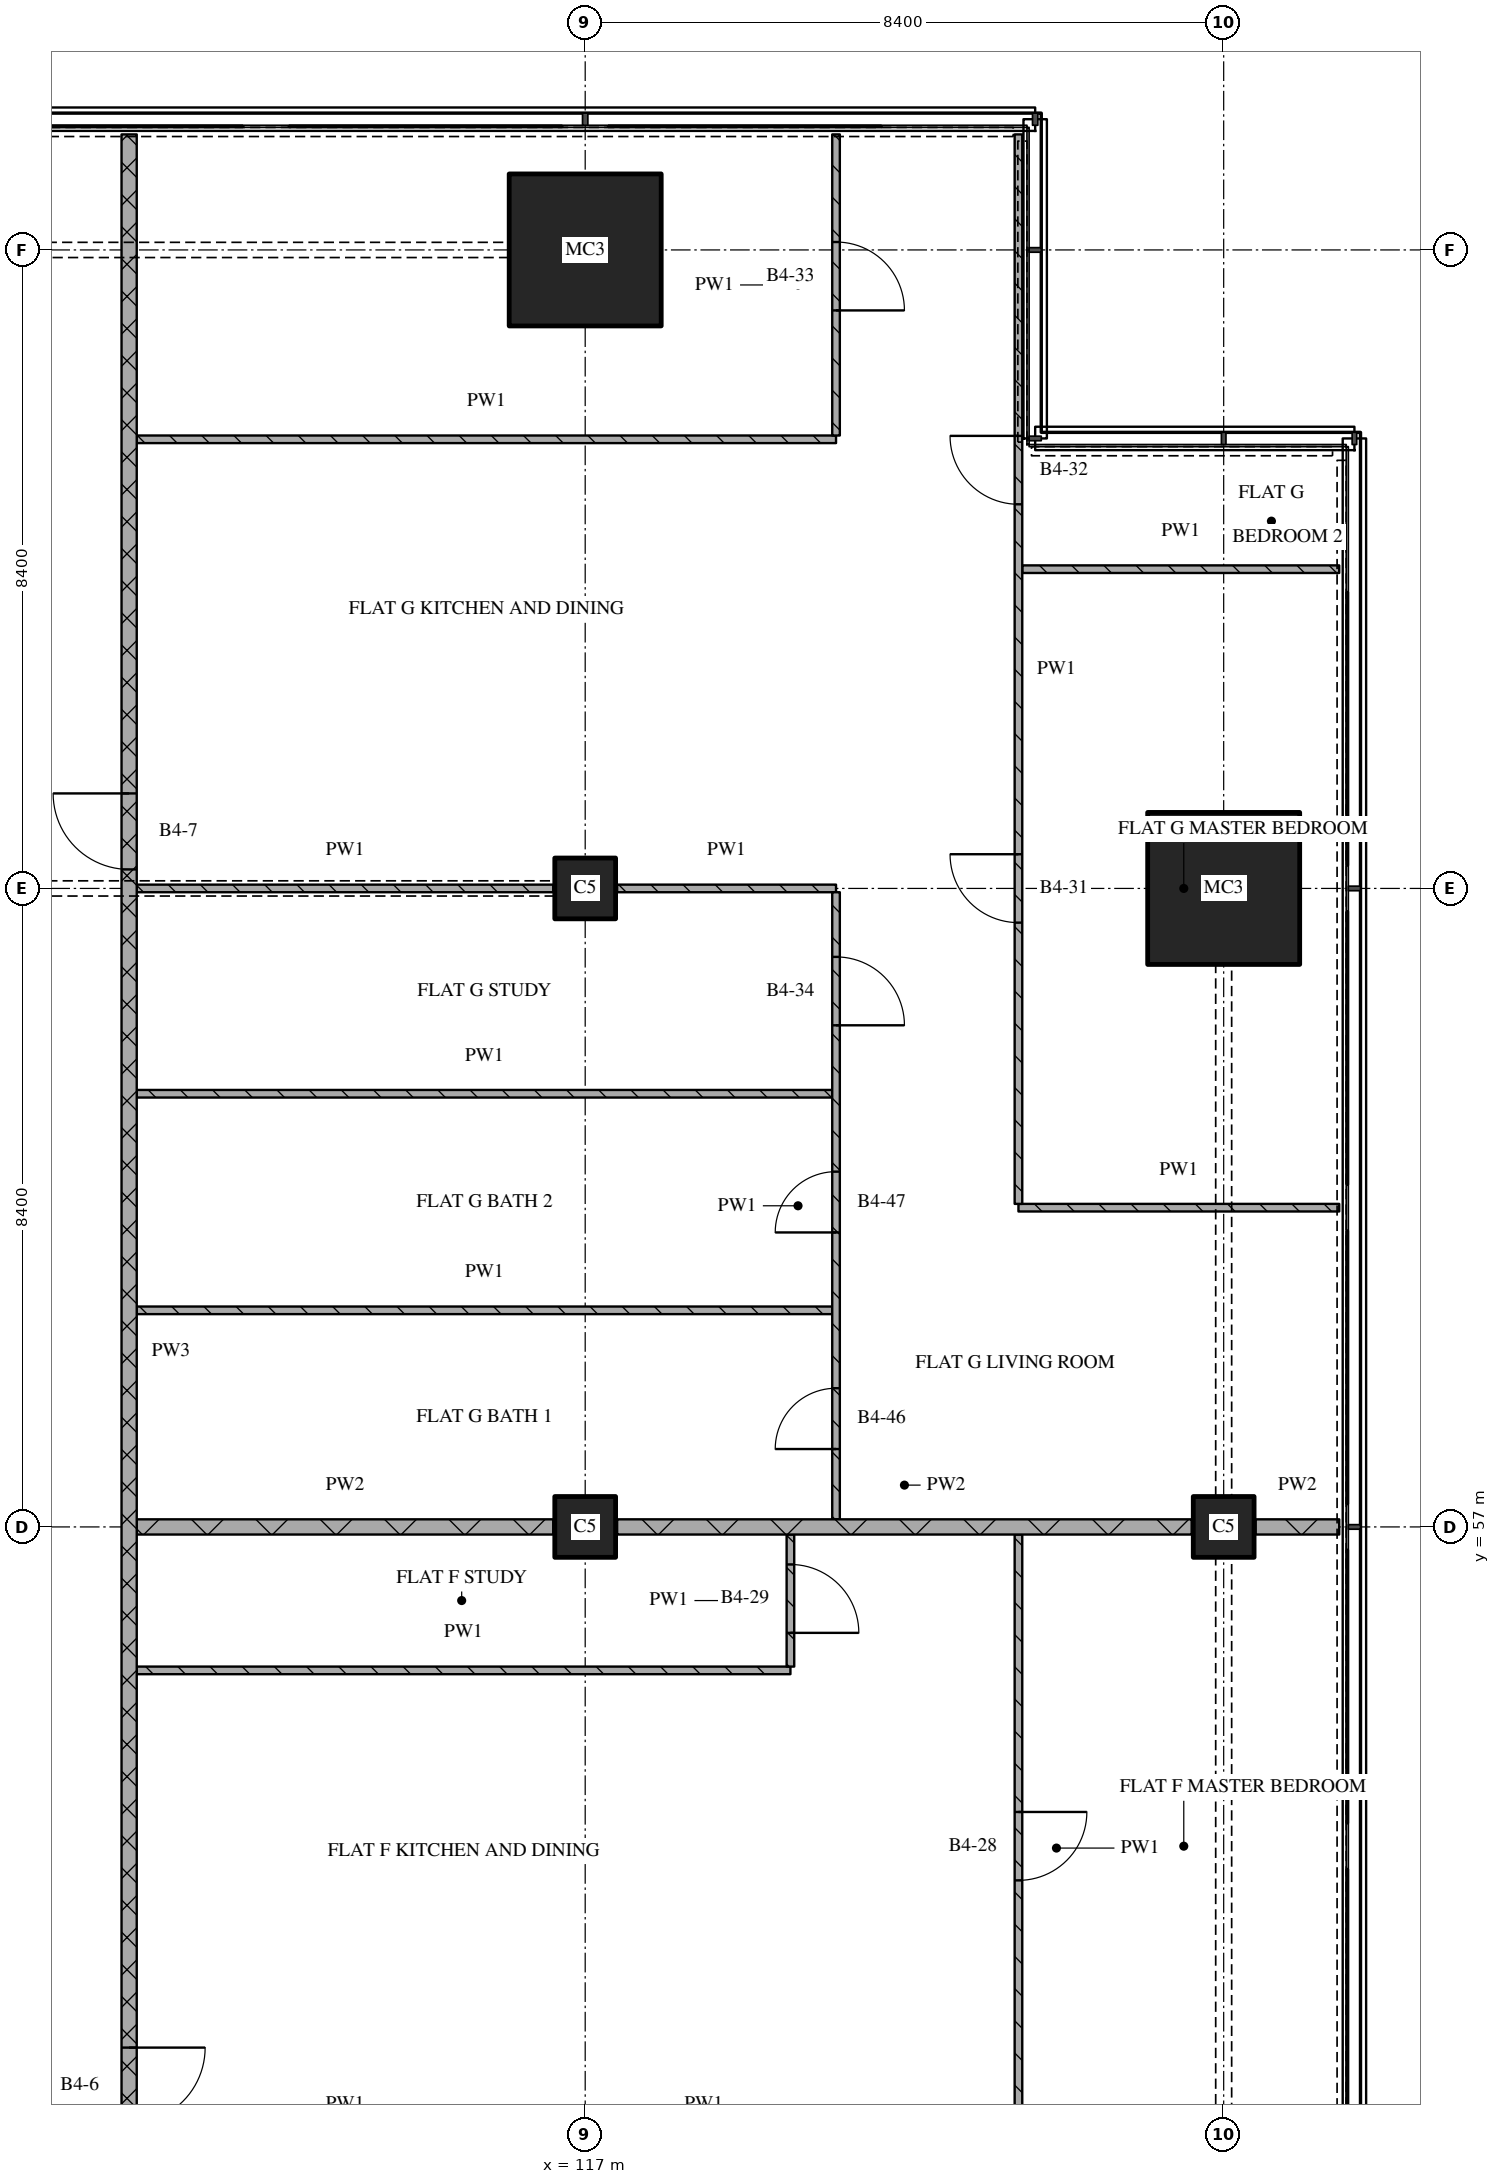
"""IFC4 building model, lengths in metres.
Left out: names, types, materials, properties, quantities, classifications, styles, units other than length and angle.
Written with IfcOpenShell. Run it as: python <this file> out.ifc"""

import sys

from ifc_helpers import new_model, si_unit, direction, frame, frame_2d, origin, origin_2d, place, context, subcontext, project, spatial, rectangle, extrude, element, fill, save


model = new_model("IFC4")
c1 = context("Model", 3, precision=1e-05, world=origin(), true_north=direction((0.0, 1.0)))
c2 = subcontext(c1, "Body", "Model", "MODEL_VIEW")
j1 = project(units=[si_unit("LENGTHUNIT", "METRE"), si_unit("PLANEANGLEUNIT", "RADIAN")], contexts=[c1])
p1 = place(None, origin())
s1 = spatial("IfcSite", under=j1, at=p1, CompositionType="ELEMENT")
p2 = place(p1, origin())
s2 = spatial("IfcBuilding", under=s1, at=p2, CompositionType="ELEMENT")
p3 = place(p2, frame((0.0, 0.0, 127.65)))
s3 = spatial("IfcBuildingStorey", under=s2, at=p3, CompositionType="ELEMENT", Elevation=127.65)
for number, where, z_axis, x_axis in (
    (1, (117.0, 57.0, 0.0), (0.0, 0.0, 1.0), (1.0, 0.0, 0.0)),
    (2, (117.0, 65.4, 0.0), (0.0, 0.0, 1.0), (1.0, 0.0, 0.0)),
):
    element("IfcColumn", number, at=place(p3, frame(where, z_axis=z_axis, x_axis=x_axis)), inside=s3, PredefinedType="COLUMN", context=c2, shape_type="SweptSolid", body=[
        extrude(rectangle(XDim=0.8, YDim=0.8, at=origin_2d()), origin(), (0.0, 0.0, 1.0), 3.6),
    ])
p4 = place(p3, frame((117.0, 73.8, 0.0), z_axis=(0.0, 0.0, 1.0), x_axis=(1.0, 0.0, 0.0)))
e3 = element("IfcColumn", 3, at=p4, inside=s3, PredefinedType="COLUMN", context=c2, shape_type="SweptSolid", body=[
    extrude(rectangle(XDim=2.0, YDim=2.0, at=origin_2d()), origin(), (0.0, 0.0, 1.0), 3.6),
])
p5 = place(p3, frame((125.4, 57.0, 0.0), z_axis=(0.0, 0.0, 1.0), x_axis=(1.0, 0.0, 0.0)))
e4 = element("IfcColumn", 4, at=p5, inside=s3, PredefinedType="COLUMN", context=c2, shape_type="SweptSolid", body=[
    extrude(rectangle(XDim=0.8, YDim=0.8, at=origin_2d()), origin(), (0.0, 0.0, 1.0), 3.6),
])
p6 = place(p3, frame((125.4, 65.4, 0.0), z_axis=(0.0, 0.0, 1.0), x_axis=(1.0, 0.0, 0.0)))
e5 = element("IfcColumn", 5, at=p6, inside=s3, PredefinedType="COLUMN", context=c2, shape_type="SweptSolid", body=[
    extrude(rectangle(XDim=2.0, YDim=2.0, at=origin_2d()), origin(), (0.0, 0.0, 1.0), 3.6),
])
p7 = place(p3, frame((111.1, 55.113, 0.0), z_axis=(0.0, 0.0, 1.0), x_axis=(1.0, 0.0, 0.0)))
e6 = element("IfcWall", 6, at=p7, inside=s3, PredefinedType="PARTITIONING", context=c2, shape_type="SweptSolid", body=[
    extrude(rectangle(XDim=8.6, YDim=0.1, at=frame_2d((4.3, 0.0))), origin(), (0.0, 0.0, 1.0), 3.32),
])
p8 = place(p3, frame((111.1, 57.0, 0.0), z_axis=(0.0, 0.0, 1.0), x_axis=(1.0, 0.0, 0.0)))
e7 = element("IfcWall", 7, at=p8, inside=s3, PredefinedType="PARTITIONING", context=c2, shape_type="SweptSolid", body=[
    extrude(rectangle(XDim=5.48, YDim=0.2, at=frame_2d((2.74, 0.0))), origin(), (0.0, 0.0, 1.0), 3.32),
])
p9 = place(p3, frame((117.42, 57.0, 0.0), z_axis=(0.0, 0.0, 1.0), x_axis=(1.0, 0.0, 0.0)))
e8 = element("IfcWall", 8, at=p9, inside=s3, PredefinedType="PARTITIONING", context=c2, shape_type="SweptSolid", body=[
    extrude(rectangle(XDim=7.56, YDim=0.2, at=frame_2d((3.78, 0.0))), origin(), (0.0, 0.0, 1.0), 3.32),
])
p10 = place(p3, frame((125.82, 57.0, 0.0), z_axis=(0.0, 0.0, 1.0), x_axis=(1.0, 0.0, 0.0)))
e9 = element("IfcWall", 9, at=p10, inside=s3, PredefinedType="PARTITIONING", context=c2, shape_type="SweptSolid", body=[
    extrude(rectangle(XDim=1.1, YDim=0.2, at=frame_2d((0.55, 0.0))), origin(), (0.0, 0.0, 1.0), 3.32),
])
p11 = place(p3, frame((111.1, 59.85, 0.0), z_axis=(0.0, 0.0, 1.0), x_axis=(1.0, 0.0, 0.0)))
e10 = element("IfcWall", 10, at=p11, inside=s3, PredefinedType="PARTITIONING", context=c2, shape_type="SweptSolid", body=[
    extrude(rectangle(XDim=9.15, YDim=0.1, at=frame_2d((4.575, 0.0))), origin(), (0.0, 0.0, 1.0), 3.32),
])
p12 = place(p3, frame((122.7, 61.2, 0.0), z_axis=(0.0, 0.0, 1.0), x_axis=(1.0, 0.0, 0.0)))
e11 = element("IfcWall", 11, at=p12, inside=s3, PredefinedType="PARTITIONING", context=c2, shape_type="SweptSolid", body=[
    extrude(rectangle(XDim=4.22, YDim=0.1, at=frame_2d((2.11, 0.0))), origin(), (0.0, 0.0, 1.0), 3.32),
])
p13 = place(p3, frame((111.1, 62.699, 0.0), z_axis=(0.0, 0.0, 1.0), x_axis=(1.0, 0.0, 0.0)))
e12 = element("IfcWall", 12, at=p13, inside=s3, PredefinedType="PARTITIONING", context=c2, shape_type="SweptSolid", body=[
    extrude(rectangle(XDim=9.15, YDim=0.1, at=frame_2d((4.575, 0.0))), origin(), (0.0, 0.0, 1.0), 3.32),
])
p14 = place(p3, frame((111.1, 65.4, 0.0), z_axis=(0.0, 0.0, 1.0), x_axis=(1.0, 0.0, 0.0)))
e13 = element("IfcWall", 13, at=p14, inside=s3, PredefinedType="PARTITIONING", context=c2, shape_type="SweptSolid", body=[
    extrude(rectangle(XDim=5.48, YDim=0.1, at=frame_2d((2.74, 0.0))), origin(), (0.0, 0.0, 1.0), 2.82),
])
p15 = place(p3, frame((117.42, 65.4, 0.0), z_axis=(0.0, 0.0, 1.0), x_axis=(1.0, 0.0, 0.0)))
e14 = element("IfcWall", 14, at=p15, inside=s3, PredefinedType="PARTITIONING", context=c2, shape_type="SweptSolid", body=[
    extrude(rectangle(XDim=2.88, YDim=0.1, at=frame_2d((1.44, 0.0))), origin(), (0.0, 0.0, 1.0), 3.32),
])
p16 = place(p3, frame((122.75, 69.6, 0.0), z_axis=(0.0, 0.0, 1.0), x_axis=(1.0, 0.0, 0.0)))
e15 = element("IfcWall", 15, at=p16, inside=s3, PredefinedType="PARTITIONING", context=c2, shape_type="SweptSolid", body=[
    extrude(rectangle(XDim=4.17, YDim=0.1, at=frame_2d((2.085, 0.0))), origin(), (0.0, 0.0, 1.0), 3.32),
])
p17 = place(p3, frame((111.1, 71.309, 0.0), z_axis=(0.0, 0.0, 1.0), x_axis=(1.0, 0.0, 0.0)))
e16 = element("IfcWall", 16, at=p17, inside=s3, PredefinedType="PARTITIONING", context=c2, shape_type="SweptSolid", body=[
    extrude(rectangle(XDim=9.2, YDim=0.1, at=frame_2d((4.6, 0.0))), origin(), (0.0, 0.0, 1.0), 3.32),
])
p18 = place(p3, frame((111.0, 75.32, 0.0), z_axis=(0.0, 0.0, 1.0), x_axis=(0.0, -1.0, 0.0)))
e17 = element("IfcWall", 17, at=p18, inside=s3, PredefinedType="PARTITIONING", context=c2, shape_type="SweptSolid", body=[
    extrude(rectangle(XDim=32.02, YDim=0.2, at=frame_2d((16.01, 0.0))), origin(), (0.0, 0.0, 1.0), 3.32),
])
p19 = place(p18, frame((8.67, 0.0, 0.0)))
e18 = element("IfcOpeningElement", 18, at=p19, cuts=e17, PredefinedType="OPENING", context=c2, shape_type="SweptSolid", body=[
    extrude(rectangle(XDim=1.0, YDim=2.1, at=frame_2d((0.5, 1.05))), frame((0.0, 0.11, 0.0), z_axis=(0.0, -1.0, 0.0), x_axis=(1.0, 0.0, 0.0)), (0.0, 0.0, 1.0), 0.22),
])
p20 = place(p18, frame((25.17, 0.0, 0.0)))
e19 = element("IfcOpeningElement", 19, at=p20, cuts=e17, PredefinedType="OPENING", context=c2, shape_type="SweptSolid", body=[
    extrude(rectangle(XDim=1.0, YDim=2.1, at=frame_2d((0.5, 1.05))), frame((0.0, 0.11, 0.0), z_axis=(0.0, -1.0, 0.0), x_axis=(1.0, 0.0, 0.0)), (0.0, 0.0, 1.0), 0.22),
])
p21 = place(p3, frame((119.7, 55.163, 0.0), z_axis=(0.0, 0.0, 1.0), x_axis=(0.0, 1.0, 0.0)))
e20 = element("IfcWall", 20, at=p21, inside=s3, PredefinedType="PARTITIONING", context=c2, shape_type="SweptSolid", body=[
    extrude(rectangle(XDim=1.737, YDim=0.1, at=frame_2d((0.869, 0.0))), origin(), (0.0, 0.0, 1.0), 3.32),
])
p22 = place(p21, frame((0.444, 0.0, 0.0)))
e21 = element("IfcOpeningElement", 21, at=p22, cuts=e20, PredefinedType="OPENING", context=c2, shape_type="SweptSolid", body=[
    extrude(rectangle(XDim=0.9, YDim=2.1, at=frame_2d((0.45, 1.05))), frame((0.0, 0.06, 0.0), z_axis=(0.0, -1.0, 0.0), x_axis=(1.0, 0.0, 0.0)), (0.0, 0.0, 1.0), 0.12),
])
p23 = place(p3, frame((120.3, 57.1, 0.0), z_axis=(0.0, 0.0, 1.0), x_axis=(0.0, 1.0, 0.0)))
e22 = element("IfcWall", 22, at=p23, inside=s3, PredefinedType="PARTITIONING", context=c2, shape_type="SweptSolid", body=[
    extrude(rectangle(XDim=8.25, YDim=0.1, at=frame_2d((4.125, 0.0))), origin(), (0.0, 0.0, 1.0), 3.32),
])
p24 = place(p23, frame((0.925, 0.0, 0.0)))
e23 = element("IfcOpeningElement", 23, at=p24, cuts=e22, PredefinedType="OPENING", context=c2, shape_type="SweptSolid", body=[
    extrude(rectangle(XDim=0.8, YDim=2.1, at=frame_2d((0.4, 1.05))), frame((0.0, 0.06, 0.0), z_axis=(0.0, -1.0, 0.0), x_axis=(1.0, 0.0, 0.0)), (0.0, 0.0, 1.0), 0.12),
])
p25 = place(p23, frame((3.774, 0.0, 0.0)))
e24 = element("IfcOpeningElement", 24, at=p25, cuts=e22, PredefinedType="OPENING", context=c2, shape_type="SweptSolid", body=[
    extrude(rectangle(XDim=0.8, YDim=2.1, at=frame_2d((0.4, 1.05))), frame((0.0, 0.06, 0.0), z_axis=(0.0, -1.0, 0.0), x_axis=(1.0, 0.0, 0.0)), (0.0, 0.0, 1.0), 0.12),
])
p26 = place(p23, frame((6.5, 0.0, 0.0)))
e25 = element("IfcOpeningElement", 25, at=p26, cuts=e22, PredefinedType="OPENING", context=c2, shape_type="SweptSolid", body=[
    extrude(rectangle(XDim=0.9, YDim=2.1, at=frame_2d((0.45, 1.05))), frame((0.0, 0.06, 0.0), z_axis=(0.0, -1.0, 0.0), x_axis=(1.0, 0.0, 0.0)), (0.0, 0.0, 1.0), 0.12),
])
p27 = place(p3, frame((120.3, 71.359, 0.0), z_axis=(0.0, 0.0, 1.0), x_axis=(0.0, 1.0, 0.0)))
e26 = element("IfcWall", 26, at=p27, inside=s3, PredefinedType="PARTITIONING", context=c2, shape_type="SweptSolid", body=[
    extrude(rectangle(XDim=3.961, YDim=0.1, at=frame_2d((1.981, 0.0))), origin(), (0.0, 0.0, 1.0), 3.32),
])
p28 = place(p27, frame((1.646, 0.0, 0.0)))
e27 = element("IfcOpeningElement", 27, at=p28, cuts=e26, PredefinedType="OPENING", context=c2, shape_type="SweptSolid", body=[
    extrude(rectangle(XDim=0.9, YDim=2.1, at=frame_2d((0.45, 1.05))), frame((0.0, 0.06, 0.0), z_axis=(0.0, -1.0, 0.0), x_axis=(1.0, 0.0, 0.0)), (0.0, 0.0, 1.0), 0.12),
])
p29 = place(p3, frame((122.7, 56.9, 0.0), z_axis=(0.0, 0.0, 1.0), x_axis=(0.0, -1.0, 0.0)))
e28 = element("IfcWall", 28, at=p29, inside=s3, PredefinedType="PARTITIONING", context=c2, shape_type="SweptSolid", body=[
    extrude(rectangle(XDim=8.25, YDim=0.1, at=frame_2d((4.125, 0.0))), origin(), (0.0, 0.0, 1.0), 3.32),
])
p30 = place(p29, frame((3.65, 0.0, 0.0)))
e29 = element("IfcOpeningElement", 29, at=p30, cuts=e28, PredefinedType="OPENING", context=c2, shape_type="SweptSolid", body=[
    extrude(rectangle(XDim=0.9, YDim=2.1, at=frame_2d((0.45, 1.05))), frame((0.0, 0.06, 0.0), z_axis=(0.0, -1.0, 0.0), x_axis=(1.0, 0.0, 0.0)), (0.0, 0.0, 1.0), 0.12),
])
p31 = place(p3, frame((122.7, 75.32, 0.0), z_axis=(0.0, 0.0, 1.0), x_axis=(0.0, -1.0, 0.0)))
e30 = element("IfcWall", 30, at=p31, inside=s3, PredefinedType="PARTITIONING", context=c2, shape_type="SweptSolid", body=[
    extrude(rectangle(XDim=14.07, YDim=0.1, at=frame_2d((7.035, 0.0))), origin(), (0.0, 0.0, 1.0), 3.32),
])
p32 = place(p31, frame((3.966, 0.0, 0.0)))
e31 = element("IfcOpeningElement", 31, at=p32, cuts=e30, PredefinedType="OPENING", context=c2, shape_type="SweptSolid", body=[
    extrude(rectangle(XDim=0.9, YDim=2.1, at=frame_2d((0.45, 1.05))), frame((0.0, 0.06, 0.0), z_axis=(0.0, -1.0, 0.0), x_axis=(1.0, 0.0, 0.0)), (0.0, 0.0, 1.0), 0.12),
])
p33 = place(p31, frame((9.47, 0.0, 0.0)))
e32 = element("IfcOpeningElement", 32, at=p33, cuts=e30, PredefinedType="OPENING", context=c2, shape_type="SweptSolid", body=[
    extrude(rectangle(XDim=0.9, YDim=2.1, at=frame_2d((0.45, 1.05))), frame((0.0, 0.06, 0.0), z_axis=(0.0, -1.0, 0.0), x_axis=(1.0, 0.0, 0.0)), (0.0, 0.0, 1.0), 0.12),
])
p34 = place(p19, origin())
e33 = element("IfcDoor", 33, at=p34, inside=s3, OperationType="SINGLE_SWING_RIGHT", PredefinedType="DOOR", context=c2, shape_type="SweptSolid", body=[
    extrude(rectangle(XDim=1.0, YDim=2.1, at=frame_2d((0.5, 1.05))), frame((0.0, 0.025, 0.0), z_axis=(0.0, -1.0, 0.0), x_axis=(1.0, 0.0, 0.0)), (0.0, 0.0, 1.0), 0.05),
])
fill(e18, e33)
p35 = place(p20, origin())
e34 = element("IfcDoor", 34, at=p35, inside=s3, OperationType="SINGLE_SWING_LEFT", PredefinedType="DOOR", context=c2, shape_type="SweptSolid", body=[
    extrude(rectangle(XDim=1.0, YDim=2.1, at=frame_2d((0.5, 1.05))), frame((0.0, 0.025, 0.0), z_axis=(0.0, -1.0, 0.0), x_axis=(1.0, 0.0, 0.0)), (0.0, 0.0, 1.0), 0.05),
])
fill(e19, e34)
p36 = place(p22, origin())
e35 = element("IfcDoor", 35, at=p36, inside=s3, OperationType="SINGLE_SWING_RIGHT", PredefinedType="DOOR", context=c2, shape_type="SweptSolid", body=[
    extrude(rectangle(XDim=0.9, YDim=2.1, at=frame_2d((0.45, 1.05))), frame((0.0, 0.025, 0.0), z_axis=(0.0, -1.0, 0.0), x_axis=(1.0, 0.0, 0.0)), (0.0, 0.0, 1.0), 0.05),
])
fill(e21, e35)
p37 = place(p24, origin())
e36 = element("IfcDoor", 36, at=p37, inside=s3, OperationType="SINGLE_SWING_LEFT", PredefinedType="DOOR", context=c2, shape_type="SweptSolid", body=[
    extrude(rectangle(XDim=0.8, YDim=2.1, at=frame_2d((0.4, 1.05))), frame((0.0, 0.025, 0.0), z_axis=(0.0, -1.0, 0.0), x_axis=(1.0, 0.0, 0.0)), (0.0, 0.0, 1.0), 0.05),
])
fill(e23, e36)
p38 = place(p25, origin())
e37 = element("IfcDoor", 37, at=p38, inside=s3, OperationType="SINGLE_SWING_LEFT", PredefinedType="DOOR", context=c2, shape_type="SweptSolid", body=[
    extrude(rectangle(XDim=0.8, YDim=2.1, at=frame_2d((0.4, 1.05))), frame((0.0, 0.025, 0.0), z_axis=(0.0, -1.0, 0.0), x_axis=(1.0, 0.0, 0.0)), (0.0, 0.0, 1.0), 0.05),
])
fill(e24, e37)
p39 = place(p26, origin())
e38 = element("IfcDoor", 38, at=p39, inside=s3, OperationType="SINGLE_SWING_RIGHT", PredefinedType="DOOR", context=c2, shape_type="SweptSolid", body=[
    extrude(rectangle(XDim=0.9, YDim=2.1, at=frame_2d((0.45, 1.05))), frame((0.0, 0.025, 0.0), z_axis=(0.0, -1.0, 0.0), x_axis=(1.0, 0.0, 0.0)), (0.0, 0.0, 1.0), 0.05),
])
fill(e25, e38)
p40 = place(p28, origin())
e39 = element("IfcDoor", 39, at=p40, inside=s3, OperationType="SINGLE_SWING_RIGHT", PredefinedType="DOOR", context=c2, shape_type="SweptSolid", body=[
    extrude(rectangle(XDim=0.9, YDim=2.1, at=frame_2d((0.45, 1.05))), frame((0.0, 0.025, 0.0), z_axis=(0.0, -1.0, 0.0), x_axis=(1.0, 0.0, 0.0)), (0.0, 0.0, 1.0), 0.05),
])
fill(e27, e39)
p41 = place(p30, origin())
e40 = element("IfcDoor", 40, at=p41, inside=s3, OperationType="SINGLE_SWING_LEFT", PredefinedType="DOOR", context=c2, shape_type="SweptSolid", body=[
    extrude(rectangle(XDim=0.9, YDim=2.1, at=frame_2d((0.45, 1.05))), frame((0.0, 0.025, 0.0), z_axis=(0.0, -1.0, 0.0), x_axis=(1.0, 0.0, 0.0)), (0.0, 0.0, 1.0), 0.05),
])
fill(e29, e40)
p42 = place(p32, origin())
e41 = element("IfcDoor", 41, at=p42, inside=s3, OperationType="SINGLE_SWING_RIGHT", PredefinedType="DOOR", context=c2, shape_type="SweptSolid", body=[
    extrude(rectangle(XDim=0.9, YDim=2.1, at=frame_2d((0.45, 1.05))), frame((0.0, 0.025, 0.0), z_axis=(0.0, -1.0, 0.0), x_axis=(1.0, 0.0, 0.0)), (0.0, 0.0, 1.0), 0.05),
])
fill(e31, e41)
p43 = place(p33, origin())
e42 = element("IfcDoor", 42, at=p43, inside=s3, OperationType="SINGLE_SWING_RIGHT", PredefinedType="DOOR", context=c2, shape_type="SweptSolid", body=[
    extrude(rectangle(XDim=0.9, YDim=2.1, at=frame_2d((0.45, 1.05))), frame((0.0, 0.025, 0.0), z_axis=(0.0, -1.0, 0.0), x_axis=(1.0, 0.0, 0.0)), (0.0, 0.0, 1.0), 0.05),
])
fill(e32, e42)
save(model, sys.argv[1])
